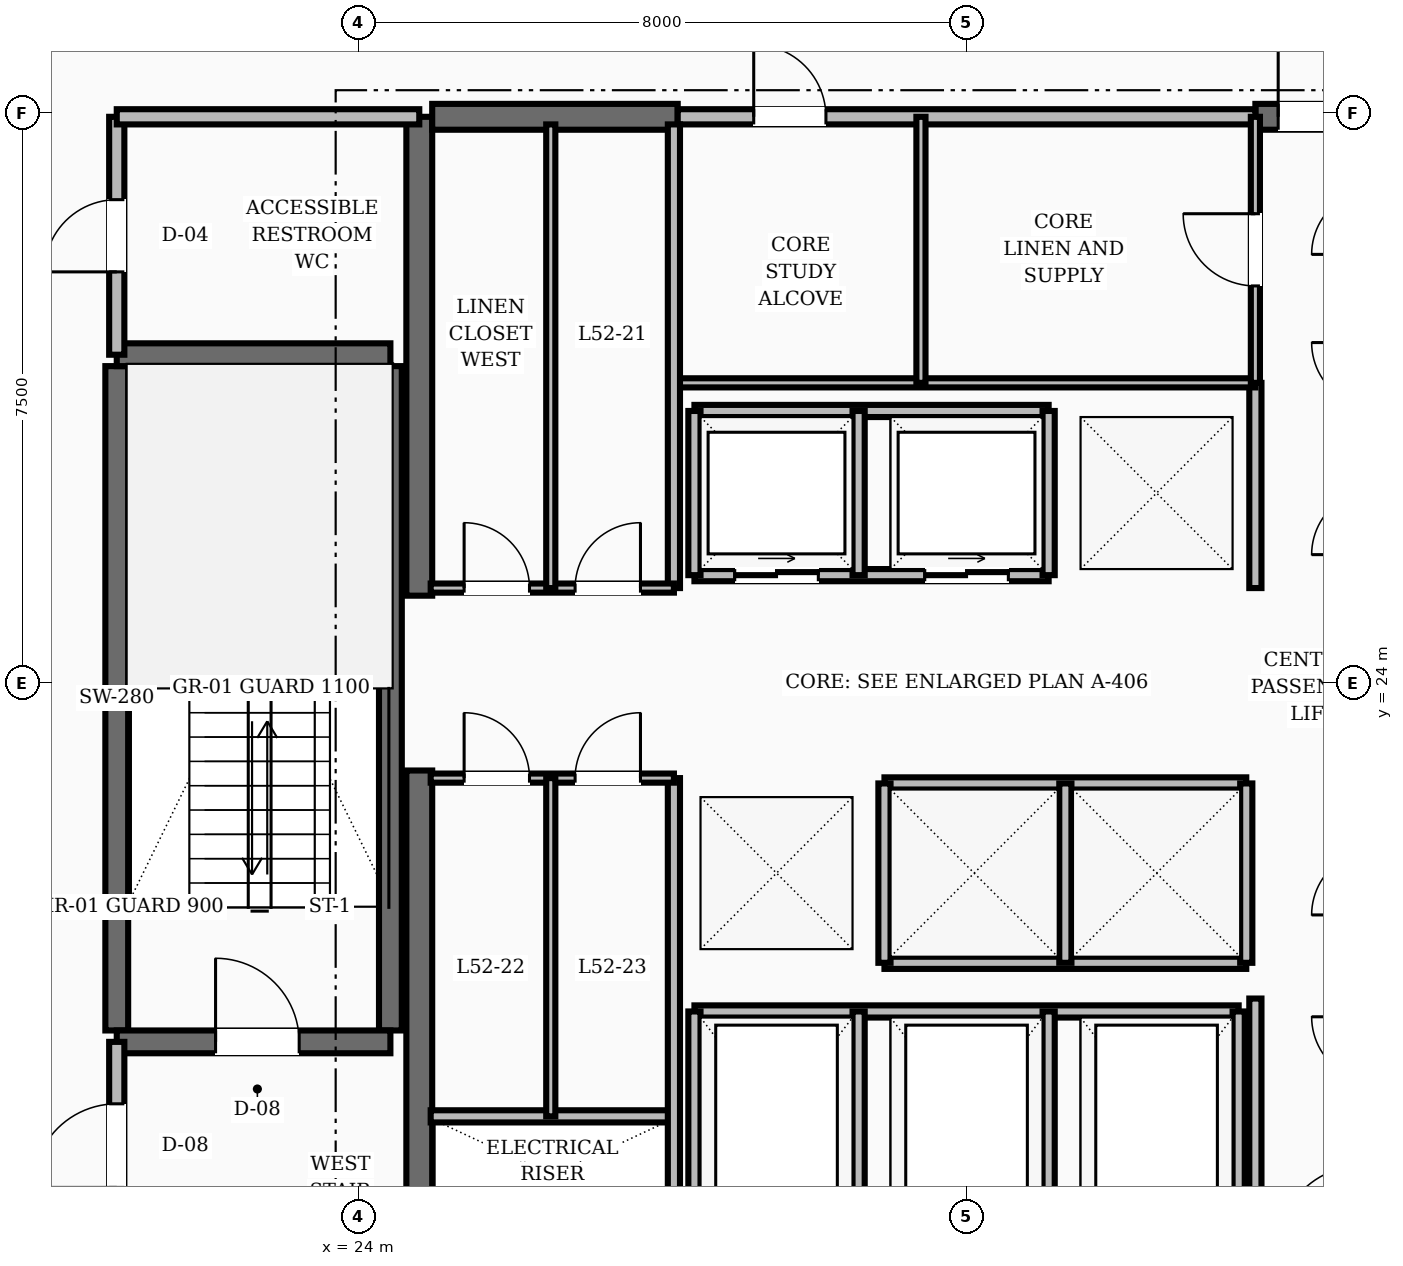
"""IFC4 building model, lengths in metres.
Left out: names, types, materials, properties, quantities, classifications, styles, units other than length and angle.
Written with IfcOpenShell. Run it as: python <this file> out.ifc"""

import sys

from ifc_helpers import new_model, si_unit, direction, frame, frame_2d, origin, place, context, subcontext, project, spatial, rectangle, extrude, element, fill, save


model = new_model("IFC4")
c1 = context("Model", 3, precision=1e-05, world=origin(), true_north=direction((0.0, 1.0)))
c2 = subcontext(c1, "Body", "Model", "MODEL_VIEW")
j1 = project(units=[si_unit("LENGTHUNIT", "METRE"), si_unit("PLANEANGLEUNIT", "RADIAN")], contexts=[c1])
p1 = place(None, origin())
s1 = spatial("IfcSite", under=j1, at=p1, CompositionType="ELEMENT")
p2 = place(p1, origin())
s2 = spatial("IfcBuilding", under=s1, at=p2, CompositionType="ELEMENT")
p3 = place(p2, frame((0.0, 0.0, 200.0)))
s3 = spatial("IfcBuildingStorey", under=s2, at=p3, CompositionType="ELEMENT", Elevation=200.0)
for number, where, z_axis, x_axis in (
    (1, (24.8, 16.55, 0.0), (0.0, 0.0, 1.0), (0.0, 1.0, 0.0)),
    (2, (24.8, 25.15, 0.0), (0.0, 0.0, 1.0), (0.0, 1.0, 0.0)),
):
    element("IfcWall", number, at=place(p3, frame(where, z_axis=z_axis, x_axis=x_axis)), inside=s3, PredefinedType="SHEAR", context=c2, shape_type="SweptSolid", body=[
        extrude(rectangle(XDim=6.3, YDim=0.34, at=frame_2d((3.15, 0.0))), origin(), (0.0, 0.0, 1.0), 3.6),
    ])
p4 = place(p3, frame((24.97, 31.45, 0.0), z_axis=(0.0, 0.0, 1.0), x_axis=(1.0, 0.0, 0.0)))
e3 = element("IfcWall", 3, at=p4, inside=s3, PredefinedType="SHEAR", context=c2, shape_type="SweptSolid", body=[
    extrude(rectangle(XDim=3.23, YDim=0.34, at=frame_2d((1.615, 0.0))), origin(), (0.0, 0.0, 1.0), 3.6),
])
p5 = place(p3, frame((35.8, 31.45, 0.0), z_axis=(0.0, 0.0, 1.0), x_axis=(1.0, 0.0, 0.0)))
e4 = element("IfcWall", 4, at=p5, inside=s3, PredefinedType="SHEAR", context=c2, shape_type="SweptSolid", body=[
    extrude(rectangle(XDim=3.23, YDim=0.34, at=frame_2d((1.615, 0.0))), origin(), (0.0, 0.0, 1.0), 3.6),
])
p6 = place(p5, frame((0.3, 0.0, 0.0)))
e5 = element("IfcOpeningElement", 5, at=p6, cuts=e4, PredefinedType="OPENING", context=c2, shape_type="SweptSolid", body=[
    extrude(rectangle(XDim=1.1, YDim=2.1, at=frame_2d((0.55, 1.05))), frame((0.0, 0.18, 0.0), z_axis=(0.0, -1.0, 0.0), x_axis=(1.0, 0.0, 0.0)), (0.0, 0.0, 1.0), 0.36),
])
for number, where, z_axis, x_axis in (
    (6, (20.82, 19.43, 0.0), (0.0, 0.0, 1.0), (0.0, 1.0, 0.0)),
    (7, (24.42, 19.43, 0.0), (0.0, 0.0, 1.0), (0.0, 1.0, 0.0)),
):
    element("IfcWall", number, at=place(p3, frame(where, z_axis=z_axis, x_axis=x_axis)), inside=s3, PredefinedType="SHEAR", context=c2, shape_type="SweptSolid", body=[
        extrude(rectangle(XDim=8.74, YDim=0.3, at=frame_2d((4.37, 0.0))), origin(), (0.0, 0.0, 1.0), 3.6),
    ])
p7 = place(p3, frame((20.82, 19.28, 0.0), z_axis=(0.0, 0.0, 1.0), x_axis=(1.0, 0.0, 0.0)))
e8 = element("IfcWall", 8, at=p7, inside=s3, PredefinedType="SHEAR", context=c2, shape_type="SweptSolid", body=[
    extrude(rectangle(XDim=3.6, YDim=0.3, at=frame_2d((1.8, 0.0))), origin(), (0.0, 0.0, 1.0), 3.6),
])
p8 = place(p7, frame((1.3, 0.0, 0.0)))
e9 = element("IfcOpeningElement", 9, at=p8, cuts=e8, PredefinedType="OPENING", context=c2, shape_type="SweptSolid", body=[
    extrude(rectangle(XDim=1.1, YDim=2.1, at=frame_2d((0.55, 1.05))), frame((0.0, 0.16, 0.0), z_axis=(0.0, -1.0, 0.0), x_axis=(1.0, 0.0, 0.0)), (0.0, 0.0, 1.0), 0.32),
])
p9 = place(p3, frame((20.82, 28.32, 0.0), z_axis=(0.0, 0.0, 1.0), x_axis=(1.0, 0.0, 0.0)))
e10 = element("IfcWall", 10, at=p9, inside=s3, PredefinedType="SHEAR", context=c2, shape_type="SweptSolid", body=[
    extrude(rectangle(XDim=3.6, YDim=0.3, at=frame_2d((1.8, 0.0))), origin(), (0.0, 0.0, 1.0), 3.6),
])
p10 = place(p3, frame((20.82, 16.55, 0.0), z_axis=(0.0, 0.0, 1.0), x_axis=(0.0, 1.0, 0.0)))
e11 = element("IfcWall", 11, at=p10, inside=s3, PredefinedType="SOLIDWALL", context=c2, shape_type="SweptSolid", body=[
    extrude(rectangle(XDim=2.73, YDim=0.2, at=frame_2d((1.365, 0.0))), origin(), (0.0, 0.0, 1.0), 2.75),
])
p11 = place(p10, frame((0.815, 0.0, 0.0)))
e12 = element("IfcOpeningElement", 12, at=p11, cuts=e11, PredefinedType="OPENING", context=c2, shape_type="SweptSolid", body=[
    extrude(rectangle(XDim=1.1, YDim=2.1, at=frame_2d((0.55, 1.05))), frame((0.0, 0.11, 0.0), z_axis=(0.0, -1.0, 0.0), x_axis=(1.0, 0.0, 0.0)), (0.0, 0.0, 1.0), 0.22),
])
p12 = place(p3, frame((20.82, 28.32, 0.0), z_axis=(0.0, 0.0, 1.0), x_axis=(0.0, 1.0, 0.0)))
e13 = element("IfcWall", 13, at=p12, inside=s3, PredefinedType="SOLIDWALL", context=c2, shape_type="SweptSolid", body=[
    extrude(rectangle(XDim=3.13, YDim=0.2, at=frame_2d((1.565, 0.0))), origin(), (0.0, 0.0, 1.0), 2.75),
])
p13 = place(p12, frame((1.09, 0.0, 0.0)))
e14 = element("IfcOpeningElement", 14, at=p13, cuts=e13, PredefinedType="OPENING", context=c2, shape_type="SweptSolid", body=[
    extrude(rectangle(XDim=0.95, YDim=2.1, at=frame_2d((0.475, 1.05))), frame((0.0, 0.11, 0.0), z_axis=(0.0, -1.0, 0.0), x_axis=(1.0, 0.0, 0.0)), (0.0, 0.0, 1.0), 0.22),
])
p14 = place(p3, frame((20.82, 31.45, 0.0), z_axis=(0.0, 0.0, 1.0), x_axis=(1.0, 0.0, 0.0)))
e15 = element("IfcWall", 15, at=p14, inside=s3, PredefinedType="SOLIDWALL", context=c2, shape_type="SweptSolid", body=[
    extrude(rectangle(XDim=3.98, YDim=0.2, at=frame_2d((1.99, 0.0))), origin(), (0.0, 0.0, 1.0), 2.75),
])
p15 = place(p3, frame((35.8, 16.55, 0.0), z_axis=(0.0, 0.0, 1.0), x_axis=(0.0, 1.0, 0.0)))
e16 = element("IfcWall", 16, at=p15, inside=s3, PredefinedType="SOLIDWALL", context=c2, shape_type="SweptSolid", body=[
    extrude(rectangle(XDim=3.3, YDim=0.16, at=frame_2d((1.65, 0.0))), origin(), (0.0, 0.0, 1.0), 2.75),
])
p16 = place(p3, frame((35.8, 25.25, 0.0), z_axis=(0.0, 0.0, 1.0), x_axis=(0.0, 1.0, 0.0)))
e17 = element("IfcWall", 17, at=p16, inside=s3, PredefinedType="SOLIDWALL", context=c2, shape_type="SweptSolid", body=[
    extrude(rectangle(XDim=2.7, YDim=0.16, at=frame_2d((1.35, 0.0))), origin(), (0.0, 0.0, 1.0), 2.75),
])
p17 = place(p3, frame((28.42, 25.42, 0.0), z_axis=(0.0, 0.0, 1.0), x_axis=(1.0, 0.0, 0.0)))
e18 = element("IfcWall", 18, at=p17, inside=s3, PredefinedType="SOLIDWALL", context=c2, shape_type="SweptSolid", body=[
    extrude(rectangle(XDim=4.66, YDim=0.16, at=frame_2d((2.33, 0.0))), origin(), (0.0, 0.0, 1.0), 2.75),
])
p18 = place(p17, frame((0.53, 0.0, 0.0)))
e19 = element("IfcOpeningElement", 19, at=p18, cuts=e18, PredefinedType="OPENING", context=c2, shape_type="SweptSolid", body=[
    extrude(rectangle(XDim=1.1, YDim=2.15, at=frame_2d((0.55, 1.075))), frame((0.0, 0.09, 0.0), z_axis=(0.0, -1.0, 0.0), x_axis=(1.0, 0.0, 0.0)), (0.0, 0.0, 1.0), 0.18),
])
p19 = place(p17, frame((3.03, 0.0, 0.0)))
e20 = element("IfcOpeningElement", 20, at=p19, cuts=e18, PredefinedType="OPENING", context=c2, shape_type="SweptSolid", body=[
    extrude(rectangle(XDim=1.1, YDim=2.15, at=frame_2d((0.55, 1.075))), frame((0.0, 0.09, 0.0), z_axis=(0.0, -1.0, 0.0), x_axis=(1.0, 0.0, 0.0)), (0.0, 0.0, 1.0), 0.18),
])
p20 = place(p3, frame((28.42, 27.58, 0.0), z_axis=(0.0, 0.0, 1.0), x_axis=(1.0, 0.0, 0.0)))
e21 = element("IfcWall", 21, at=p20, inside=s3, PredefinedType="SOLIDWALL", context=c2, shape_type="SweptSolid", body=[
    extrude(rectangle(XDim=4.66, YDim=0.16, at=frame_2d((2.33, 0.0))), origin(), (0.0, 0.0, 1.0), 2.75),
])
for number, where, z_axis, x_axis in (
    (22, (28.42, 25.42, 0.0), (0.0, 0.0, 1.0), (0.0, 1.0, 0.0)),
    (23, (30.58, 25.42, 0.0), (0.0, 0.0, 1.0), (0.0, 1.0, 0.0)),
    (24, (33.08, 25.42, 0.0), (0.0, 0.0, 1.0), (0.0, 1.0, 0.0)),
):
    element("IfcWall", number, at=place(p3, frame(where, z_axis=z_axis, x_axis=x_axis)), inside=s3, PredefinedType="SOLIDWALL", context=c2, shape_type="SweptSolid", body=[
        extrude(rectangle(XDim=2.16, YDim=0.16, at=frame_2d((1.08, 0.0))), origin(), (0.0, 0.0, 1.0), 2.75),
    ])
for number, where, z_axis, x_axis in (
    (25, (30.92, 22.68, 0.0), (0.0, 0.0, 1.0), (1.0, 0.0, 0.0)),
    (26, (30.92, 20.32, 0.0), (0.0, 0.0, 1.0), (1.0, 0.0, 0.0)),
):
    element("IfcWall", number, at=place(p3, frame(where, z_axis=z_axis, x_axis=x_axis)), inside=s3, PredefinedType="SOLIDWALL", context=c2, shape_type="SweptSolid", body=[
        extrude(rectangle(XDim=4.76, YDim=0.16, at=frame_2d((2.38, 0.0))), origin(), (0.0, 0.0, 1.0), 2.75),
    ])
for number, where, z_axis, x_axis in (
    (27, (30.92, 20.32, 0.0), (0.0, 0.0, 1.0), (0.0, 1.0, 0.0)),
    (28, (33.3, 20.32, 0.0), (0.0, 0.0, 1.0), (0.0, 1.0, 0.0)),
    (29, (35.68, 20.32, 0.0), (0.0, 0.0, 1.0), (0.0, 1.0, 0.0)),
):
    element("IfcWall", number, at=place(p3, frame(where, z_axis=z_axis, x_axis=x_axis)), inside=s3, PredefinedType="SOLIDWALL", context=c2, shape_type="SweptSolid", body=[
        extrude(rectangle(XDim=2.36, YDim=0.16, at=frame_2d((1.18, 0.0))), origin(), (0.0, 0.0, 1.0), 2.75),
    ])
p21 = place(p3, frame((28.42, 19.68, 0.0), z_axis=(0.0, 0.0, 1.0), x_axis=(1.0, 0.0, 0.0)))
e30 = element("IfcWall", 30, at=p21, inside=s3, PredefinedType="SOLIDWALL", context=c2, shape_type="SweptSolid", body=[
    extrude(rectangle(XDim=7.16, YDim=0.16, at=frame_2d((3.58, 0.0))), origin(), (0.0, 0.0, 1.0), 2.75),
])
for number, where, z_axis, x_axis in (
    (31, (28.42, 16.92, 0.0), (0.0, 0.0, 1.0), (0.0, 1.0, 0.0)),
    (32, (30.58, 16.92, 0.0), (0.0, 0.0, 1.0), (0.0, 1.0, 0.0)),
    (33, (33.08, 16.92, 0.0), (0.0, 0.0, 1.0), (0.0, 1.0, 0.0)),
    (34, (35.58, 16.92, 0.0), (0.0, 0.0, 1.0), (0.0, 1.0, 0.0)),
):
    element("IfcWall", number, at=place(p3, frame(where, z_axis=z_axis, x_axis=x_axis)), inside=s3, PredefinedType="SOLIDWALL", context=c2, shape_type="SweptSolid", body=[
        extrude(rectangle(XDim=2.76, YDim=0.16, at=frame_2d((1.38, 0.0))), origin(), (0.0, 0.0, 1.0), 2.75),
    ])
p22 = place(p3, frame((28.2, 31.45, 0.0), z_axis=(0.0, 0.0, 1.0), x_axis=(1.0, 0.0, 0.0)))
e35 = element("IfcWall", 35, at=p22, inside=s3, PredefinedType="SOLIDWALL", context=c2, shape_type="SweptSolid", body=[
    extrude(rectangle(XDim=7.6, YDim=0.2, at=frame_2d((3.8, 0.0))), origin(), (0.0, 0.0, 1.0), 2.75),
])
p23 = place(p22, frame((1.0, 0.0, 0.0)))
e36 = element("IfcOpeningElement", 36, at=p23, cuts=e35, PredefinedType="OPENING", context=c2, shape_type="SweptSolid", body=[
    extrude(rectangle(XDim=0.95, YDim=2.1, at=frame_2d((0.475, 1.05))), frame((0.0, 0.11, 0.0), z_axis=(0.0, -1.0, 0.0), x_axis=(1.0, 0.0, 0.0)), (0.0, 0.0, 1.0), 0.22),
])
p24 = place(p3, frame((28.2, 27.95, 0.0), z_axis=(0.0, 0.0, 1.0), x_axis=(1.0, 0.0, 0.0)))
e37 = element("IfcWall", 37, at=p24, inside=s3, PredefinedType="PARTITIONING", context=c2, shape_type="SweptSolid", body=[
    extrude(rectangle(XDim=7.6, YDim=0.12, at=frame_2d((3.8, 0.0))), origin(), (0.0, 0.0, 1.0), 2.75),
])
p25 = place(p3, frame((35.8, 27.95, 0.0), z_axis=(0.0, 0.0, 1.0), x_axis=(0.0, 1.0, 0.0)))
e38 = element("IfcWall", 38, at=p25, inside=s3, PredefinedType="PARTITIONING", context=c2, shape_type="SweptSolid", body=[
    extrude(rectangle(XDim=3.5, YDim=0.12, at=frame_2d((1.75, 0.0))), origin(), (0.0, 0.0, 1.0), 2.75),
])
p26 = place(p25, frame((1.275, 0.0, 0.0)))
e39 = element("IfcOpeningElement", 39, at=p26, cuts=e38, PredefinedType="OPENING", context=c2, shape_type="SweptSolid", body=[
    extrude(rectangle(XDim=0.95, YDim=2.1, at=frame_2d((0.475, 1.05))), frame((0.0, 0.07, 0.0), z_axis=(0.0, -1.0, 0.0), x_axis=(1.0, 0.0, 0.0)), (0.0, 0.0, 1.0), 0.14),
])
p27 = place(p3, frame((31.4, 27.95, 0.0), z_axis=(0.0, 0.0, 1.0), x_axis=(0.0, 1.0, 0.0)))
e40 = element("IfcWall", 40, at=p27, inside=s3, PredefinedType="PARTITIONING", context=c2, shape_type="SweptSolid", body=[
    extrude(rectangle(XDim=3.5, YDim=0.12, at=frame_2d((1.75, 0.0))), origin(), (0.0, 0.0, 1.0), 2.75),
])
p28 = place(p3, frame((24.95, 18.3, 0.0), z_axis=(0.0, 0.0, 1.0), x_axis=(1.0, 0.0, 0.0)))
e41 = element("IfcWall", 41, at=p28, inside=s3, PredefinedType="SOLIDWALL", context=c2, shape_type="SweptSolid", body=[
    extrude(rectangle(XDim=3.2, YDim=0.16, at=frame_2d((1.6, 0.0))), origin(), (0.0, 0.0, 1.0), 2.75),
])
p29 = place(p3, frame((28.15, 16.7, 0.0), z_axis=(0.0, 0.0, 1.0), x_axis=(0.0, 1.0, 0.0)))
e42 = element("IfcWall", 42, at=p29, inside=s3, PredefinedType="SOLIDWALL", context=c2, shape_type="SweptSolid", body=[
    extrude(rectangle(XDim=6.05, YDim=0.16, at=frame_2d((3.025, 0.0))), origin(), (0.0, 0.0, 1.0), 2.75),
])
p30 = place(p3, frame((28.15, 25.25, 0.0), z_axis=(0.0, 0.0, 1.0), x_axis=(0.0, 1.0, 0.0)))
e43 = element("IfcWall", 43, at=p30, inside=s3, PredefinedType="SOLIDWALL", context=c2, shape_type="SweptSolid", body=[
    extrude(rectangle(XDim=6.1, YDim=0.16, at=frame_2d((3.05, 0.0))), origin(), (0.0, 0.0, 1.0), 2.75),
])
p31 = place(p3, frame((24.95, 25.25, 0.0), z_axis=(0.0, 0.0, 1.0), x_axis=(1.0, 0.0, 0.0)))
e44 = element("IfcWall", 44, at=p31, inside=s3, PredefinedType="PARTITIONING", context=c2, shape_type="SweptSolid", body=[
    extrude(rectangle(XDim=3.2, YDim=0.12, at=frame_2d((1.6, 0.0))), origin(), (0.0, 0.0, 1.0), 2.75),
])
p32 = place(p31, frame((0.44, 0.0, 0.0)))
e45 = element("IfcOpeningElement", 45, at=p32, cuts=e44, PredefinedType="OPENING", context=c2, shape_type="SweptSolid", body=[
    extrude(rectangle(XDim=0.86, YDim=2.1, at=frame_2d((0.43, 1.05))), frame((0.0, 0.07, 0.0), z_axis=(0.0, -1.0, 0.0), x_axis=(1.0, 0.0, 0.0)), (0.0, 0.0, 1.0), 0.14),
])
p33 = place(p31, frame((1.9, 0.0, 0.0)))
e46 = element("IfcOpeningElement", 46, at=p33, cuts=e44, PredefinedType="OPENING", context=c2, shape_type="SweptSolid", body=[
    extrude(rectangle(XDim=0.86, YDim=2.1, at=frame_2d((0.43, 1.05))), frame((0.0, 0.07, 0.0), z_axis=(0.0, -1.0, 0.0), x_axis=(1.0, 0.0, 0.0)), (0.0, 0.0, 1.0), 0.14),
])
p34 = place(p3, frame((24.95, 22.75, 0.0), z_axis=(0.0, 0.0, 1.0), x_axis=(1.0, 0.0, 0.0)))
e47 = element("IfcWall", 47, at=p34, inside=s3, PredefinedType="PARTITIONING", context=c2, shape_type="SweptSolid", body=[
    extrude(rectangle(XDim=3.2, YDim=0.12, at=frame_2d((1.6, 0.0))), origin(), (0.0, 0.0, 1.0), 2.75),
])
p35 = place(p34, frame((0.44, 0.0, 0.0)))
e48 = element("IfcOpeningElement", 48, at=p35, cuts=e47, PredefinedType="OPENING", context=c2, shape_type="SweptSolid", body=[
    extrude(rectangle(XDim=0.86, YDim=2.1, at=frame_2d((0.43, 1.05))), frame((0.0, 0.07, 0.0), z_axis=(0.0, -1.0, 0.0), x_axis=(1.0, 0.0, 0.0)), (0.0, 0.0, 1.0), 0.14),
])
p36 = place(p34, frame((1.9, 0.0, 0.0)))
e49 = element("IfcOpeningElement", 49, at=p36, cuts=e47, PredefinedType="OPENING", context=c2, shape_type="SweptSolid", body=[
    extrude(rectangle(XDim=0.86, YDim=2.1, at=frame_2d((0.43, 1.05))), frame((0.0, 0.07, 0.0), z_axis=(0.0, -1.0, 0.0), x_axis=(1.0, 0.0, 0.0)), (0.0, 0.0, 1.0), 0.14),
])
p37 = place(p3, frame((26.53, 25.25, 0.0), z_axis=(0.0, 0.0, 1.0), x_axis=(0.0, 1.0, 0.0)))
e50 = element("IfcWall", 50, at=p37, inside=s3, PredefinedType="PARTITIONING", context=c2, shape_type="SweptSolid", body=[
    extrude(rectangle(XDim=6.1, YDim=0.12, at=frame_2d((3.05, 0.0))), origin(), (0.0, 0.0, 1.0), 2.75),
])
p38 = place(p3, frame((26.53, 18.3, 0.0), z_axis=(0.0, 0.0, 1.0), x_axis=(0.0, 1.0, 0.0)))
e51 = element("IfcWall", 51, at=p38, inside=s3, PredefinedType="PARTITIONING", context=c2, shape_type="SweptSolid", body=[
    extrude(rectangle(XDim=4.45, YDim=0.12, at=frame_2d((2.225, 0.0))), origin(), (0.0, 0.0, 1.0), 2.75),
])
p39 = place(p8, origin())
e52 = element("IfcDoor", 52, at=p39, inside=s3, OperationType="SINGLE_SWING_LEFT", PredefinedType="DOOR", context=c2, shape_type="SweptSolid", body=[
    extrude(rectangle(XDim=1.1, YDim=2.1, at=frame_2d((0.55, 1.05))), frame((0.0, 0.025, 0.0), z_axis=(0.0, -1.0, 0.0), x_axis=(1.0, 0.0, 0.0)), (0.0, 0.0, 1.0), 0.05),
])
fill(e9, e52)
p40 = place(p11, origin())
e53 = element("IfcDoor", 53, at=p40, inside=s3, OperationType="SINGLE_SWING_LEFT", PredefinedType="DOOR", context=c2, shape_type="SweptSolid", body=[
    extrude(rectangle(XDim=1.1, YDim=2.1, at=frame_2d((0.55, 1.05))), frame((0.0, 0.025, 0.0), z_axis=(0.0, -1.0, 0.0), x_axis=(1.0, 0.0, 0.0)), (0.0, 0.0, 1.0), 0.05),
])
fill(e12, e53)
p41 = place(p13, origin())
e54 = element("IfcDoor", 54, at=p41, inside=s3, OperationType="SINGLE_SWING_LEFT", PredefinedType="DOOR", context=c2, shape_type="SweptSolid", body=[
    extrude(rectangle(XDim=0.95, YDim=2.1, at=frame_2d((0.475, 1.05))), frame((0.0, 0.025, 0.0), z_axis=(0.0, -1.0, 0.0), x_axis=(1.0, 0.0, 0.0)), (0.0, 0.0, 1.0), 0.05),
])
fill(e14, e54)
p42 = place(p6, origin())
e55 = element("IfcDoor", 55, at=p42, inside=s3, OperationType="SINGLE_SWING_LEFT", PredefinedType="DOOR", context=c2, shape_type="SweptSolid", body=[
    extrude(rectangle(XDim=1.1, YDim=2.1, at=frame_2d((0.55, 1.05))), frame((0.0, 0.025, 0.0), z_axis=(0.0, -1.0, 0.0), x_axis=(1.0, 0.0, 0.0)), (0.0, 0.0, 1.0), 0.05),
])
fill(e5, e55)
p43 = place(p18, origin())
e56 = element("IfcDoor", 56, at=p43, inside=s3, OperationType="SLIDING_TO_RIGHT", PredefinedType="DOOR", context=c2, shape_type="SweptSolid", body=[
    extrude(rectangle(XDim=1.1, YDim=2.15, at=frame_2d((0.55, 1.075))), frame((0.0, 0.025, 0.0), z_axis=(0.0, -1.0, 0.0), x_axis=(1.0, 0.0, 0.0)), (0.0, 0.0, 1.0), 0.05),
])
fill(e19, e56)
p44 = place(p19, origin())
e57 = element("IfcDoor", 57, at=p44, inside=s3, OperationType="SLIDING_TO_RIGHT", PredefinedType="DOOR", context=c2, shape_type="SweptSolid", body=[
    extrude(rectangle(XDim=1.1, YDim=2.15, at=frame_2d((0.55, 1.075))), frame((0.0, 0.025, 0.0), z_axis=(0.0, -1.0, 0.0), x_axis=(1.0, 0.0, 0.0)), (0.0, 0.0, 1.0), 0.05),
])
fill(e20, e57)
p45 = place(p23, origin())
e58 = element("IfcDoor", 58, at=p45, inside=s3, OperationType="SINGLE_SWING_LEFT", PredefinedType="DOOR", context=c2, shape_type="SweptSolid", body=[
    extrude(rectangle(XDim=0.95, YDim=2.1, at=frame_2d((0.475, 1.05))), frame((0.0, 0.025, 0.0), z_axis=(0.0, -1.0, 0.0), x_axis=(1.0, 0.0, 0.0)), (0.0, 0.0, 1.0), 0.05),
])
fill(e36, e58)
p46 = place(p26, origin())
e59 = element("IfcDoor", 59, at=p46, inside=s3, OperationType="SINGLE_SWING_RIGHT", PredefinedType="DOOR", context=c2, shape_type="SweptSolid", body=[
    extrude(rectangle(XDim=0.95, YDim=2.1, at=frame_2d((0.475, 1.05))), frame((0.0, 0.025, 0.0), z_axis=(0.0, -1.0, 0.0), x_axis=(1.0, 0.0, 0.0)), (0.0, 0.0, 1.0), 0.05),
])
fill(e39, e59)
p47 = place(p32, origin())
e60 = element("IfcDoor", 60, at=p47, inside=s3, OperationType="SINGLE_SWING_LEFT", PredefinedType="DOOR", context=c2, shape_type="SweptSolid", body=[
    extrude(rectangle(XDim=0.86, YDim=2.1, at=frame_2d((0.43, 1.05))), frame((0.0, 0.025, 0.0), z_axis=(0.0, -1.0, 0.0), x_axis=(1.0, 0.0, 0.0)), (0.0, 0.0, 1.0), 0.05),
])
fill(e45, e60)
p48 = place(p33, origin())
e61 = element("IfcDoor", 61, at=p48, inside=s3, OperationType="SINGLE_SWING_RIGHT", PredefinedType="DOOR", context=c2, shape_type="SweptSolid", body=[
    extrude(rectangle(XDim=0.86, YDim=2.1, at=frame_2d((0.43, 1.05))), frame((0.0, 0.025, 0.0), z_axis=(0.0, -1.0, 0.0), x_axis=(1.0, 0.0, 0.0)), (0.0, 0.0, 1.0), 0.05),
])
fill(e46, e61)
p49 = place(p35, origin())
e62 = element("IfcDoor", 62, at=p49, inside=s3, OperationType="SINGLE_SWING_LEFT", PredefinedType="DOOR", context=c2, shape_type="SweptSolid", body=[
    extrude(rectangle(XDim=0.86, YDim=2.1, at=frame_2d((0.43, 1.05))), frame((0.0, 0.025, 0.0), z_axis=(0.0, -1.0, 0.0), x_axis=(1.0, 0.0, 0.0)), (0.0, 0.0, 1.0), 0.05),
])
fill(e48, e62)
p50 = place(p36, origin())
e63 = element("IfcDoor", 63, at=p50, inside=s3, OperationType="SINGLE_SWING_RIGHT", PredefinedType="DOOR", context=c2, shape_type="SweptSolid", body=[
    extrude(rectangle(XDim=0.86, YDim=2.1, at=frame_2d((0.43, 1.05))), frame((0.0, 0.025, 0.0), z_axis=(0.0, -1.0, 0.0), x_axis=(1.0, 0.0, 0.0)), (0.0, 0.0, 1.0), 0.05),
])
fill(e49, e63)
save(model, sys.argv[1])
